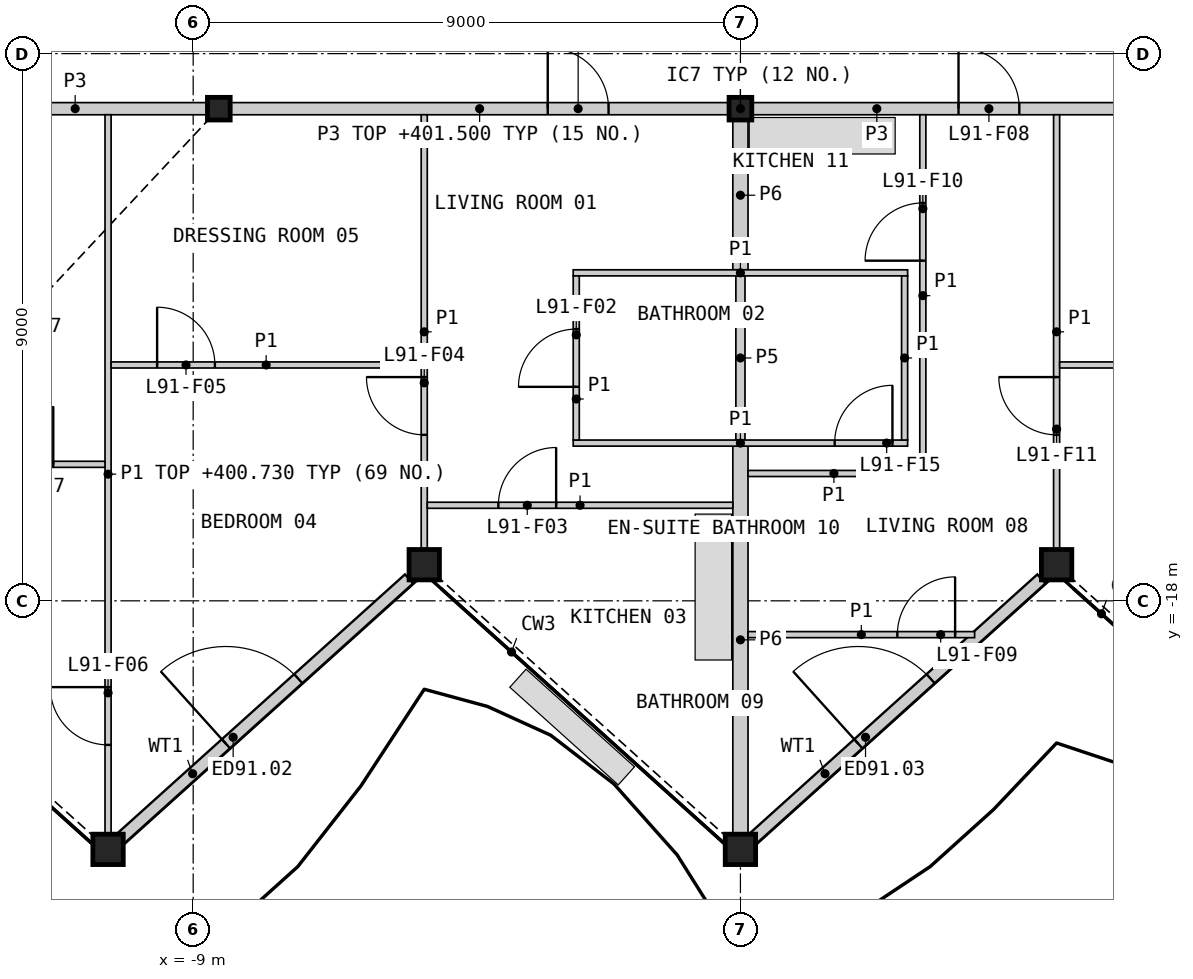
"""IFC4 building model, lengths in metres.
Left out: names, types, materials, properties, quantities, classifications, styles, units other than length and angle.
Written with IfcOpenShell. Run it as: python <this file> out.ifc"""

import sys

from ifc_helpers import new_model, si_unit, direction, frame, frame_2d, origin, origin_2d, place, context, subcontext, project, spatial, rectangle, hollow_rectangle, i_section, extrude, element, fill, save


model = new_model("IFC4")
c1 = context("Model", 3, precision=1e-05, world=origin(), true_north=direction((0.0, 1.0)))
c2 = subcontext(c1, "Body", "Model", "MODEL_VIEW")
j1 = project(units=[si_unit("LENGTHUNIT", "METRE"), si_unit("PLANEANGLEUNIT", "RADIAN")], contexts=[c1])
p1 = place(None, origin())
s1 = spatial("IfcSite", under=j1, at=p1, CompositionType="ELEMENT")
p2 = place(p1, origin())
s2 = spatial("IfcBuilding", under=s1, at=p2, CompositionType="ELEMENT")
p3 = place(p2, frame((0.0, 0.0, 398.4)))
s3 = spatial("IfcBuildingStorey", under=s2, at=p3, CompositionType="ELEMENT", Elevation=398.4)
for number, where, z_axis, x_axis in (
    (1, (-10.4, -22.088, 0.0), (0.0, 0.0, 1.0), (1.0, 0.0, 0.0)),
    (2, (-5.2, -17.406, 0.0), (0.0, 0.0, 1.0), (1.0, 0.0, 0.0)),
    (3, (0.0, -22.088, 0.0), (0.0, 0.0, 1.0), (1.0, 0.0, 0.0)),
    (4, (5.2, -17.406, 0.0), (0.0, 0.0, 1.0), (1.0, 0.0, 0.0)),
):
    element("IfcColumn", number, at=place(p3, frame(where, z_axis=z_axis, x_axis=x_axis)), inside=s3, PredefinedType="COLUMN", context=c2, shape_type="SweptSolid", body=[
        extrude(hollow_rectangle(XDim=0.5, YDim=0.5, WallThickness=0.03, at=origin_2d()), origin(), (0.0, 0.0, 1.0), 3.4),
    ])
for number, where, z_axis, x_axis in (
    (5, (-8.578, -9.906, 0.0), (0.0, 0.0, 1.0), (1.0, 0.0, 0.0)),
    (6, (0.0, -9.906, 0.0), (0.0, 0.0, 1.0), (1.0, 0.0, 0.0)),
):
    element("IfcColumn", number, at=place(p3, frame(where, z_axis=z_axis, x_axis=x_axis)), inside=s3, PredefinedType="COLUMN", context=c2, shape_type="SweptSolid", body=[
        extrude(i_section(OverallWidth=0.374, OverallDepth=0.372, WebThickness=0.016, FlangeThickness=0.026, at=origin_2d()), origin(), (0.0, 0.0, 1.0), 3.4),
    ])
p4 = place(p3, frame((-10.195, -21.912, 0.0), z_axis=(0.0, 0.0, 1.0), x_axis=(0.743132515916, 0.669144277259, 0.0)))
e7 = element("IfcWall", 7, at=p4, inside=s3, PredefinedType="SOLIDWALL", context=c2, shape_type="SweptSolid", body=[
    extrude(rectangle(XDim=6.385, YDim=0.2, at=frame_2d((3.192, 0.0))), origin(), (0.0, 0.0, 1.0), 2.634),
])
p5 = place(p4, frame((2.333, 0.0, 0.0)))
e8 = element("IfcOpeningElement", 8, at=p5, cuts=e7, PredefinedType="OPENING", context=c2, shape_type="SweptSolid", body=[
    extrude(rectangle(XDim=1.6, YDim=2.25, at=frame_2d((0.8, 1.125))), frame((0.0, 0.11, 0.0), z_axis=(0.0, -1.0, 0.0), x_axis=(1.0, 0.0, 0.0)), (0.0, 0.0, 1.0), 0.22),
])
p6 = place(p3, frame((0.205, -21.912, 0.0), z_axis=(0.0, 0.0, 1.0), x_axis=(0.743132515916, 0.669144277259, 0.0)))
e9 = element("IfcWall", 9, at=p6, inside=s3, PredefinedType="SOLIDWALL", context=c2, shape_type="SweptSolid", body=[
    extrude(rectangle(XDim=6.385, YDim=0.2, at=frame_2d((3.192, 0.0))), origin(), (0.0, 0.0, 1.0), 2.634),
])
p7 = place(p6, frame((2.333, 0.0, 0.0)))
e10 = element("IfcOpeningElement", 10, at=p7, cuts=e9, PredefinedType="OPENING", context=c2, shape_type="SweptSolid", body=[
    extrude(rectangle(XDim=1.6, YDim=2.25, at=frame_2d((0.8, 1.125))), frame((0.0, 0.11, 0.0), z_axis=(0.0, -1.0, 0.0), x_axis=(1.0, 0.0, 0.0)), (0.0, 0.0, 1.0), 0.22),
])
p8 = place(p3, frame((-8.382, -9.906, 0.0), z_axis=(0.0, 0.0, 1.0), x_axis=(1.0, 0.0, 0.0)))
e11 = element("IfcWall", 11, at=p8, inside=s3, PredefinedType="PARTITIONING", context=c2, shape_type="SweptSolid", body=[
    extrude(rectangle(XDim=8.185, YDim=0.2, at=frame_2d((4.092, 0.0))), origin(), (0.0, 0.0, 1.0), 3.1),
])
p9 = place(p8, frame((5.213, 0.0, 0.0)))
e12 = element("IfcOpeningElement", 12, at=p9, cuts=e11, PredefinedType="OPENING", context=c2, shape_type="SweptSolid", body=[
    extrude(rectangle(XDim=1.0, YDim=2.1, at=frame_2d((0.5, 1.05))), frame((0.0, 0.11, 0.0), z_axis=(0.0, -1.0, 0.0), x_axis=(1.0, 0.0, 0.0)), (0.0, 0.0, 1.0), 0.22),
])
p10 = place(p3, frame((0.197, -9.906, 0.0), z_axis=(0.0, 0.0, 1.0), x_axis=(1.0, 0.0, 0.0)))
e13 = element("IfcWall", 13, at=p10, inside=s3, PredefinedType="PARTITIONING", context=c2, shape_type="SweptSolid", body=[
    extrude(rectangle(XDim=8.185, YDim=0.2, at=frame_2d((4.092, 0.0))), origin(), (0.0, 0.0, 1.0), 3.1),
])
p11 = place(p10, frame((3.39, 0.0, 0.0)))
e14 = element("IfcOpeningElement", 14, at=p11, cuts=e13, PredefinedType="OPENING", context=c2, shape_type="SweptSolid", body=[
    extrude(rectangle(XDim=1.0, YDim=2.1, at=frame_2d((0.5, 1.05))), frame((0.0, 0.11, 0.0), z_axis=(0.0, -1.0, 0.0), x_axis=(1.0, 0.0, 0.0)), (0.0, 0.0, 1.0), 0.22),
])
p12 = place(p3, frame((0.0, -21.828, 0.0), z_axis=(0.0, 0.0, 1.0), x_axis=(0.0, 1.0, 0.0)))
e15 = element("IfcWall", 15, at=p12, inside=s3, PredefinedType="PARTITIONING", context=c2, shape_type="SweptSolid", body=[
    extrude(rectangle(XDim=6.372, YDim=0.25, at=frame_2d((3.186, 0.0))), origin(), (0.0, 0.0, 1.0), 2.33),
])
p13 = place(p3, frame((-13.106, -9.906, 0.0), z_axis=(0.0, 0.0, 1.0), x_axis=(1.0, 0.0, 0.0)))
e16 = element("IfcWall", 16, at=p13, inside=s3, PredefinedType="PARTITIONING", context=c2, shape_type="SweptSolid", body=[
    extrude(rectangle(XDim=4.331, YDim=0.2, at=frame_2d((2.165, 0.0))), origin(), (0.0, 0.0, 1.0), 3.1),
])
p14 = place(p3, frame((0.0, -12.556, 0.0), z_axis=(0.0, 0.0, 1.0), x_axis=(0.0, 1.0, 0.0)))
e17 = element("IfcWall", 17, at=p14, inside=s3, PredefinedType="PARTITIONING", context=c2, shape_type="SweptSolid", body=[
    extrude(rectangle(XDim=2.453, YDim=0.25, at=frame_2d((1.227, 0.0))), origin(), (0.0, 0.0, 1.0), 2.33),
])
p15 = place(p3, frame((0.0, -15.356, 0.0), z_axis=(0.0, 0.0, 1.0), x_axis=(0.0, 1.0, 0.0)))
e18 = element("IfcWall", 18, at=p15, inside=s3, PredefinedType="PLUMBINGWALL", context=c2, shape_type="SweptSolid", body=[
    extrude(rectangle(XDim=2.7, YDim=0.15, at=frame_2d((1.35, 0.0))), origin(), (0.0, 0.0, 1.0), 2.33),
])
p16 = place(p3, frame((-10.4, -21.828, 0.0), z_axis=(0.0, 0.0, 1.0), x_axis=(0.0, 1.0, 0.0)))
e19 = element("IfcWall", 19, at=p16, inside=s3, PredefinedType="PARTITIONING", context=c2, shape_type="SweptSolid", body=[
    extrude(rectangle(XDim=11.822, YDim=0.1, at=frame_2d((5.911, 0.0))), origin(), (0.0, 0.0, 1.0), 2.33),
])
p17 = place(p16, frame((1.458, 0.0, 0.0)))
e20 = element("IfcOpeningElement", 20, at=p17, cuts=e19, PredefinedType="OPENING", context=c2, shape_type="SweptSolid", body=[
    extrude(rectangle(XDim=0.95, YDim=2.1, at=frame_2d((0.475, 1.05))), frame((0.0, 0.06, 0.0), z_axis=(0.0, -1.0, 0.0), x_axis=(1.0, 0.0, 0.0)), (0.0, 0.0, 1.0), 0.12),
])
p18 = place(p3, frame((-5.2, -17.146, 0.0), z_axis=(0.0, 0.0, 1.0), x_axis=(0.0, 1.0, 0.0)))
e21 = element("IfcWall", 21, at=p18, inside=s3, PredefinedType="PARTITIONING", context=c2, shape_type="SweptSolid", body=[
    extrude(rectangle(XDim=7.14, YDim=0.1, at=frame_2d((3.57, 0.0))), origin(), (0.0, 0.0, 1.0), 2.33),
])
p19 = place(p18, frame((1.876, 0.0, 0.0)))
e22 = element("IfcOpeningElement", 22, at=p19, cuts=e21, PredefinedType="OPENING", context=c2, shape_type="SweptSolid", body=[
    extrude(rectangle(XDim=0.95, YDim=2.1, at=frame_2d((0.475, 1.05))), frame((0.0, 0.06, 0.0), z_axis=(0.0, -1.0, 0.0), x_axis=(1.0, 0.0, 0.0)), (0.0, 0.0, 1.0), 0.12),
])
p20 = place(p3, frame((5.2, -17.146, 0.0), z_axis=(0.0, 0.0, 1.0), x_axis=(0.0, 1.0, 0.0)))
e23 = element("IfcWall", 23, at=p20, inside=s3, PredefinedType="PARTITIONING", context=c2, shape_type="SweptSolid", body=[
    extrude(rectangle(XDim=7.14, YDim=0.1, at=frame_2d((3.57, 0.0))), origin(), (0.0, 0.0, 1.0), 2.33),
])
p21 = place(p20, frame((1.876, 0.0, 0.0)))
e24 = element("IfcOpeningElement", 24, at=p21, cuts=e23, PredefinedType="OPENING", context=c2, shape_type="SweptSolid", body=[
    extrude(rectangle(XDim=0.95, YDim=2.1, at=frame_2d((0.475, 1.05))), frame((0.0, 0.06, 0.0), z_axis=(0.0, -1.0, 0.0), x_axis=(1.0, 0.0, 0.0)), (0.0, 0.0, 1.0), 0.12),
])
p22 = place(p3, frame((-16.608, -15.755, 0.0), z_axis=(0.0, 0.0, 1.0), x_axis=(1.0, 0.0, 0.0)))
e25 = element("IfcWall", 25, at=p22, inside=s3, PredefinedType="PARTITIONING", context=c2, shape_type="SweptSolid", body=[
    extrude(rectangle(XDim=6.158, YDim=0.1, at=frame_2d((3.079, 0.0))), origin(), (0.0, 0.0, 1.0), 2.33),
])
p23 = place(p22, frame((4.357, 0.0, 0.0)))
e26 = element("IfcOpeningElement", 26, at=p23, cuts=e25, PredefinedType="OPENING", context=c2, shape_type="SweptSolid", body=[
    extrude(rectangle(XDim=0.95, YDim=2.1, at=frame_2d((0.475, 1.05))), frame((0.0, 0.06, 0.0), z_axis=(0.0, -1.0, 0.0), x_axis=(1.0, 0.0, 0.0)), (0.0, 0.0, 1.0), 0.12),
])
p24 = place(p3, frame((3.0, -15.956, 0.0), z_axis=(0.0, 0.0, 1.0), x_axis=(0.0, 1.0, 0.0)))
e27 = element("IfcWall", 27, at=p24, inside=s3, PredefinedType="PARTITIONING", context=c2, shape_type="SweptSolid", body=[
    extrude(rectangle(XDim=5.95, YDim=0.1, at=frame_2d((2.975, 0.0))), origin(), (0.0, 0.0, 1.0), 2.33),
])
p25 = place(p24, frame((3.55, 0.0, 0.0)))
e28 = element("IfcOpeningElement", 28, at=p25, cuts=e27, PredefinedType="OPENING", context=c2, shape_type="SweptSolid", body=[
    extrude(rectangle(XDim=0.95, YDim=2.1, at=frame_2d((0.475, 1.05))), frame((0.0, 0.06, 0.0), z_axis=(0.0, -1.0, 0.0), x_axis=(1.0, 0.0, 0.0)), (0.0, 0.0, 1.0), 0.12),
])
p26 = place(p3, frame((-2.75, -12.606, 0.0), z_axis=(0.0, 0.0, 1.0), x_axis=(1.0, 0.0, 0.0)))
e29 = element("IfcWall", 29, at=p26, inside=s3, PredefinedType="PARTITIONING", context=c2, shape_type="SweptSolid", body=[
    extrude(rectangle(XDim=5.5, YDim=0.1, at=frame_2d((2.75, 0.0))), origin(), (0.0, 0.0, 1.0), 2.33),
])
p27 = place(p3, frame((-2.75, -15.406, 0.0), z_axis=(0.0, 0.0, 1.0), x_axis=(1.0, 0.0, 0.0)))
e30 = element("IfcWall", 30, at=p27, inside=s3, PredefinedType="PARTITIONING", context=c2, shape_type="SweptSolid", body=[
    extrude(rectangle(XDim=5.5, YDim=0.1, at=frame_2d((2.75, 0.0))), origin(), (0.0, 0.0, 1.0), 2.33),
])
p28 = place(p27, frame((4.3, 0.0, 0.0)))
e31 = element("IfcOpeningElement", 31, at=p28, cuts=e30, PredefinedType="OPENING", context=c2, shape_type="SweptSolid", body=[
    extrude(rectangle(XDim=0.95, YDim=2.1, at=frame_2d((0.475, 1.05))), frame((0.0, 0.06, 0.0), z_axis=(0.0, -1.0, 0.0), x_axis=(1.0, 0.0, 0.0)), (0.0, 0.0, 1.0), 0.12),
])
p29 = place(p3, frame((-5.15, -16.428, 0.0), z_axis=(0.0, 0.0, 1.0), x_axis=(1.0, 0.0, 0.0)))
e32 = element("IfcWall", 32, at=p29, inside=s3, PredefinedType="PARTITIONING", context=c2, shape_type="SweptSolid", body=[
    extrude(rectangle(XDim=5.025, YDim=0.1, at=frame_2d((2.512, 0.0))), origin(), (0.0, 0.0, 1.0), 2.33),
])
p30 = place(p29, frame((1.169, 0.0, 0.0)))
e33 = element("IfcOpeningElement", 33, at=p30, cuts=e32, PredefinedType="OPENING", context=c2, shape_type="SweptSolid", body=[
    extrude(rectangle(XDim=0.95, YDim=2.1, at=frame_2d((0.475, 1.05))), frame((0.0, 0.06, 0.0), z_axis=(0.0, -1.0, 0.0), x_axis=(1.0, 0.0, 0.0)), (0.0, 0.0, 1.0), 0.12),
])
p31 = place(p3, frame((-10.35, -14.121, 0.0), z_axis=(0.0, 0.0, 1.0), x_axis=(1.0, 0.0, 0.0)))
e34 = element("IfcWall", 34, at=p31, inside=s3, PredefinedType="PARTITIONING", context=c2, shape_type="SweptSolid", body=[
    extrude(rectangle(XDim=5.1, YDim=0.1, at=frame_2d((2.55, 0.0))), origin(), (0.0, 0.0, 1.0), 2.33),
])
p32 = place(p31, frame((0.757, 0.0, 0.0)))
e35 = element("IfcOpeningElement", 35, at=p32, cuts=e34, PredefinedType="OPENING", context=c2, shape_type="SweptSolid", body=[
    extrude(rectangle(XDim=0.95, YDim=2.1, at=frame_2d((0.475, 1.05))), frame((0.0, 0.06, 0.0), z_axis=(0.0, -1.0, 0.0), x_axis=(1.0, 0.0, 0.0)), (0.0, 0.0, 1.0), 0.12),
])
p33 = place(p3, frame((5.25, -14.121, 0.0), z_axis=(0.0, 0.0, 1.0), x_axis=(1.0, 0.0, 0.0)))
e36 = element("IfcWall", 36, at=p33, inside=s3, PredefinedType="PARTITIONING", context=c2, shape_type="SweptSolid", body=[
    extrude(rectangle(XDim=5.1, YDim=0.1, at=frame_2d((2.55, 0.0))), origin(), (0.0, 0.0, 1.0), 2.33),
])
p34 = place(p33, frame((3.393, 0.0, 0.0)))
e37 = element("IfcOpeningElement", 37, at=p34, cuts=e36, PredefinedType="OPENING", context=c2, shape_type="SweptSolid", body=[
    extrude(rectangle(XDim=0.95, YDim=2.1, at=frame_2d((0.475, 1.05))), frame((0.0, 0.06, 0.0), z_axis=(0.0, -1.0, 0.0), x_axis=(1.0, 0.0, 0.0)), (0.0, 0.0, 1.0), 0.12),
])
p35 = place(p3, frame((0.125, -18.556, 0.0), z_axis=(0.0, 0.0, 1.0), x_axis=(1.0, 0.0, 0.0)))
e38 = element("IfcWall", 38, at=p35, inside=s3, PredefinedType="PARTITIONING", context=c2, shape_type="SweptSolid", body=[
    extrude(rectangle(XDim=3.727, YDim=0.1, at=frame_2d((1.863, 0.0))), origin(), (0.0, 0.0, 1.0), 2.33),
])
p36 = place(p35, frame((2.456, 0.0, 0.0)))
e39 = element("IfcOpeningElement", 39, at=p36, cuts=e38, PredefinedType="OPENING", context=c2, shape_type="SweptSolid", body=[
    extrude(rectangle(XDim=0.95, YDim=2.1, at=frame_2d((0.475, 1.05))), frame((0.0, 0.06, 0.0), z_axis=(0.0, -1.0, 0.0), x_axis=(1.0, 0.0, 0.0)), (0.0, 0.0, 1.0), 0.12),
])
p37 = place(p3, frame((0.125, -15.906, 0.0), z_axis=(0.0, 0.0, 1.0), x_axis=(1.0, 0.0, 0.0)))
e40 = element("IfcWall", 40, at=p37, inside=s3, PredefinedType="PARTITIONING", context=c2, shape_type="SweptSolid", body=[
    extrude(rectangle(XDim=2.825, YDim=0.1, at=frame_2d((1.413, 0.0))), origin(), (0.0, 0.0, 1.0), 2.33),
])
p38 = place(p3, frame((-2.7, -15.356, 0.0), z_axis=(0.0, 0.0, 1.0), x_axis=(0.0, 1.0, 0.0)))
e41 = element("IfcWall", 41, at=p38, inside=s3, PredefinedType="PARTITIONING", context=c2, shape_type="SweptSolid", body=[
    extrude(rectangle(XDim=2.7, YDim=0.1, at=frame_2d((1.35, 0.0))), origin(), (0.0, 0.0, 1.0), 2.33),
])
p39 = place(p38, frame((0.875, 0.0, 0.0)))
e42 = element("IfcOpeningElement", 42, at=p39, cuts=e41, PredefinedType="OPENING", context=c2, shape_type="SweptSolid", body=[
    extrude(rectangle(XDim=0.95, YDim=2.1, at=frame_2d((0.475, 1.05))), frame((0.0, 0.06, 0.0), z_axis=(0.0, -1.0, 0.0), x_axis=(1.0, 0.0, 0.0)), (0.0, 0.0, 1.0), 0.12),
])
p40 = place(p3, frame((2.7, -15.356, 0.0), z_axis=(0.0, 0.0, 1.0), x_axis=(0.0, 1.0, 0.0)))
e43 = element("IfcWall", 43, at=p40, inside=s3, PredefinedType="PARTITIONING", context=c2, shape_type="SweptSolid", body=[
    extrude(rectangle(XDim=2.7, YDim=0.1, at=frame_2d((1.35, 0.0))), origin(), (0.0, 0.0, 1.0), 2.33),
])
p41 = place(p5, origin())
e44 = element("IfcDoor", 44, at=p41, inside=s3, OperationType="DOUBLE_DOOR_SINGLE_SWING", PredefinedType="DOOR", context=c2, shape_type="SweptSolid", body=[
    extrude(rectangle(XDim=1.6, YDim=2.25, at=frame_2d((0.8, 1.125))), frame((0.0, 0.025, 0.0), z_axis=(0.0, -1.0, 0.0), x_axis=(1.0, 0.0, 0.0)), (0.0, 0.0, 1.0), 0.05),
])
fill(e8, e44)
p42 = place(p7, origin())
e45 = element("IfcDoor", 45, at=p42, inside=s3, OperationType="DOUBLE_DOOR_SINGLE_SWING", PredefinedType="DOOR", context=c2, shape_type="SweptSolid", body=[
    extrude(rectangle(XDim=1.6, YDim=2.25, at=frame_2d((0.8, 1.125))), frame((0.0, 0.025, 0.0), z_axis=(0.0, -1.0, 0.0), x_axis=(1.0, 0.0, 0.0)), (0.0, 0.0, 1.0), 0.05),
])
fill(e10, e45)
p43 = place(p9, origin())
e46 = element("IfcDoor", 46, at=p43, inside=s3, OperationType="SINGLE_SWING_LEFT", PredefinedType="DOOR", context=c2, shape_type="SweptSolid", body=[
    extrude(rectangle(XDim=1.0, YDim=2.1, at=frame_2d((0.5, 1.05))), frame((0.0, 0.025, 0.0), z_axis=(0.0, -1.0, 0.0), x_axis=(1.0, 0.0, 0.0)), (0.0, 0.0, 1.0), 0.05),
])
fill(e12, e46)
p44 = place(p39, origin())
e47 = element("IfcDoor", 47, at=p44, inside=s3, OperationType="SINGLE_SWING_LEFT", PredefinedType="DOOR", context=c2, shape_type="SweptSolid", body=[
    extrude(rectangle(XDim=0.95, YDim=2.1, at=frame_2d((0.475, 1.05))), frame((0.0, 0.025, 0.0), z_axis=(0.0, -1.0, 0.0), x_axis=(1.0, 0.0, 0.0)), (0.0, 0.0, 1.0), 0.05),
])
fill(e42, e47)
p45 = place(p30, origin())
e48 = element("IfcDoor", 48, at=p45, inside=s3, OperationType="SINGLE_SWING_RIGHT", PredefinedType="DOOR", context=c2, shape_type="SweptSolid", body=[
    extrude(rectangle(XDim=0.95, YDim=2.1, at=frame_2d((0.475, 1.05))), frame((0.0, 0.025, 0.0), z_axis=(0.0, -1.0, 0.0), x_axis=(1.0, 0.0, 0.0)), (0.0, 0.0, 1.0), 0.05),
])
fill(e33, e48)
p46 = place(p19, origin())
e49 = element("IfcDoor", 49, at=p46, inside=s3, OperationType="SINGLE_SWING_RIGHT", PredefinedType="DOOR", context=c2, shape_type="SweptSolid", body=[
    extrude(rectangle(XDim=0.95, YDim=2.1, at=frame_2d((0.475, 1.05))), frame((0.0, 0.025, 0.0), z_axis=(0.0, -1.0, 0.0), x_axis=(1.0, 0.0, 0.0)), (0.0, 0.0, 1.0), 0.05),
])
fill(e22, e49)
p47 = place(p32, origin())
e50 = element("IfcDoor", 50, at=p47, inside=s3, OperationType="SINGLE_SWING_LEFT", PredefinedType="DOOR", context=c2, shape_type="SweptSolid", body=[
    extrude(rectangle(XDim=0.95, YDim=2.1, at=frame_2d((0.475, 1.05))), frame((0.0, 0.025, 0.0), z_axis=(0.0, -1.0, 0.0), x_axis=(1.0, 0.0, 0.0)), (0.0, 0.0, 1.0), 0.05),
])
fill(e35, e50)
p48 = place(p17, origin())
e51 = element("IfcDoor", 51, at=p48, inside=s3, OperationType="SINGLE_SWING_RIGHT", PredefinedType="DOOR", context=c2, shape_type="SweptSolid", body=[
    extrude(rectangle(XDim=0.95, YDim=2.1, at=frame_2d((0.475, 1.05))), frame((0.0, 0.025, 0.0), z_axis=(0.0, -1.0, 0.0), x_axis=(1.0, 0.0, 0.0)), (0.0, 0.0, 1.0), 0.05),
])
fill(e20, e51)
p49 = place(p23, origin())
e52 = element("IfcDoor", 52, at=p49, inside=s3, OperationType="SINGLE_SWING_RIGHT", PredefinedType="DOOR", context=c2, shape_type="SweptSolid", body=[
    extrude(rectangle(XDim=0.95, YDim=2.1, at=frame_2d((0.475, 1.05))), frame((0.0, 0.025, 0.0), z_axis=(0.0, -1.0, 0.0), x_axis=(1.0, 0.0, 0.0)), (0.0, 0.0, 1.0), 0.05),
])
fill(e26, e52)
p50 = place(p11, origin())
e53 = element("IfcDoor", 53, at=p50, inside=s3, OperationType="SINGLE_SWING_LEFT", PredefinedType="DOOR", context=c2, shape_type="SweptSolid", body=[
    extrude(rectangle(XDim=1.0, YDim=2.1, at=frame_2d((0.5, 1.05))), frame((0.0, 0.025, 0.0), z_axis=(0.0, -1.0, 0.0), x_axis=(1.0, 0.0, 0.0)), (0.0, 0.0, 1.0), 0.05),
])
fill(e14, e53)
p51 = place(p36, origin())
e54 = element("IfcDoor", 54, at=p51, inside=s3, OperationType="SINGLE_SWING_RIGHT", PredefinedType="DOOR", context=c2, shape_type="SweptSolid", body=[
    extrude(rectangle(XDim=0.95, YDim=2.1, at=frame_2d((0.475, 1.05))), frame((0.0, 0.025, 0.0), z_axis=(0.0, -1.0, 0.0), x_axis=(1.0, 0.0, 0.0)), (0.0, 0.0, 1.0), 0.05),
])
fill(e39, e54)
p52 = place(p25, origin())
e55 = element("IfcDoor", 55, at=p52, inside=s3, OperationType="SINGLE_SWING_LEFT", PredefinedType="DOOR", context=c2, shape_type="SweptSolid", body=[
    extrude(rectangle(XDim=0.95, YDim=2.1, at=frame_2d((0.475, 1.05))), frame((0.0, 0.025, 0.0), z_axis=(0.0, -1.0, 0.0), x_axis=(1.0, 0.0, 0.0)), (0.0, 0.0, 1.0), 0.05),
])
fill(e28, e55)
p53 = place(p21, origin())
e56 = element("IfcDoor", 56, at=p53, inside=s3, OperationType="SINGLE_SWING_RIGHT", PredefinedType="DOOR", context=c2, shape_type="SweptSolid", body=[
    extrude(rectangle(XDim=0.95, YDim=2.1, at=frame_2d((0.475, 1.05))), frame((0.0, 0.025, 0.0), z_axis=(0.0, -1.0, 0.0), x_axis=(1.0, 0.0, 0.0)), (0.0, 0.0, 1.0), 0.05),
])
fill(e24, e56)
p54 = place(p28, origin())
e57 = element("IfcDoor", 57, at=p54, inside=s3, OperationType="SINGLE_SWING_RIGHT", PredefinedType="DOOR", context=c2, shape_type="SweptSolid", body=[
    extrude(rectangle(XDim=0.95, YDim=2.1, at=frame_2d((0.475, 1.05))), frame((0.0, 0.025, 0.0), z_axis=(0.0, -1.0, 0.0), x_axis=(1.0, 0.0, 0.0)), (0.0, 0.0, 1.0), 0.05),
])
fill(e31, e57)
save(model, sys.argv[1])
